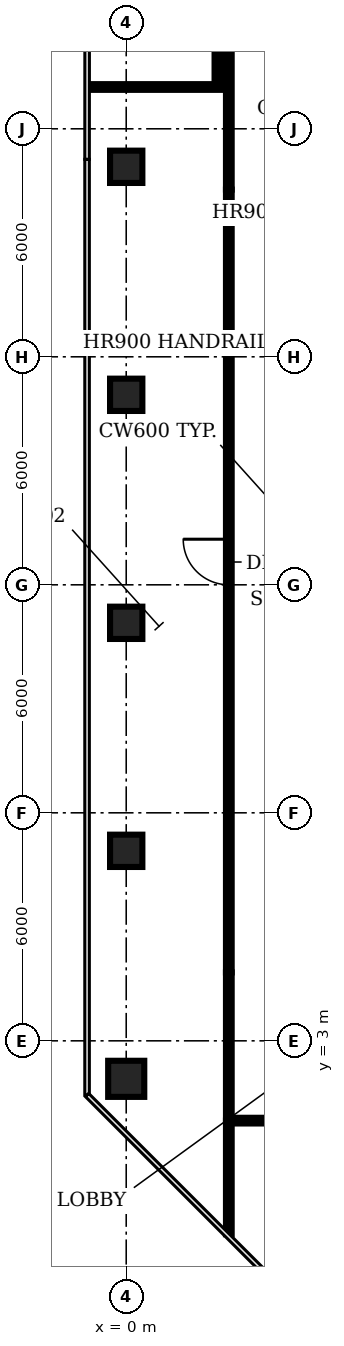
"""IFC4 building model, lengths in metres.
Left out: names, types, materials, properties, quantities, classifications, styles, units other than length and angle.
Written with IfcOpenShell. Run it as: python <this file> out.ifc"""

import sys

from ifc_helpers import new_model, si_unit, direction, frame, frame_2d, origin, origin_2d, place, context, subcontext, project, spatial, rectangle, circle, extrude, element, fill, save


model = new_model("IFC4")
c1 = context("Model", 3, precision=1e-05, world=origin(), true_north=direction((0.0, 1.0)))
c2 = subcontext(c1, "Body", "Model", "MODEL_VIEW")
j1 = project(units=[si_unit("LENGTHUNIT", "METRE"), si_unit("PLANEANGLEUNIT", "RADIAN")], contexts=[c1])
p1 = place(None, origin())
s1 = spatial("IfcSite", under=j1, at=p1, CompositionType="ELEMENT")
p2 = place(p1, origin())
s2 = spatial("IfcBuilding", under=s1, at=p2, CompositionType="ELEMENT")
p3 = place(p2, frame((0.0, 0.0, 176.0)))
s3 = spatial("IfcBuildingStorey", under=s2, at=p3, CompositionType="ELEMENT", Elevation=176.0)
p4 = place(p3, frame((0.0, 2.0, 0.0), z_axis=(0.0, 0.0, 1.0), x_axis=(1.0, 0.0, 0.0)))
e1 = element("IfcColumn", 1, at=p4, inside=s3, PredefinedType="COLUMN", context=c2, shape_type="SweptSolid", body=[
    extrude(circle(Radius=0.475, at=origin_2d()), origin(), (0.0, 0.0, 1.0), 3.85),
])
for number, where, z_axis, x_axis in (
    (2, (0.0, 8.0, 0.0), (0.0, 0.0, 1.0), (1.0, 0.0, 0.0)),
    (3, (0.0, 14.0, 0.0), (0.0, 0.0, 1.0), (1.0, 0.0, 0.0)),
    (4, (0.0, 20.0, 0.0), (0.0, 0.0, 1.0), (1.0, 0.0, 0.0)),
    (5, (0.0, 26.0, 0.0), (0.0, 0.0, 1.0), (1.0, 0.0, 0.0)),
):
    element("IfcColumn", number, at=place(p3, frame(where, z_axis=z_axis, x_axis=x_axis)), inside=s3, PredefinedType="COLUMN", context=c2, shape_type="SweptSolid", body=[
        extrude(rectangle(XDim=0.85, YDim=0.85, at=origin_2d()), origin(), (0.0, 0.0, 1.0), 3.85),
    ])
p5 = place(p3, frame((-0.969, 28.1, 0.0), z_axis=(0.0, 0.0, 1.0), x_axis=(1.0, 0.0, 0.0)))
e6 = element("IfcWall", 6, at=p5, inside=s3, PredefinedType="PARTITIONING", context=c2, shape_type="SweptSolid", body=[
    extrude(rectangle(XDim=3.669, YDim=0.15, at=frame_2d((1.834, 0.0))), origin(), (0.0, 0.0, 1.0), 2.88),
])
p6 = place(p3, frame((2.4, 28.1, 0.0), z_axis=(0.0, 0.0, 1.0), x_axis=(0.0, 1.0, 0.0)))
e7 = element("IfcWall", 7, at=p6, inside=s3, PredefinedType="PARTITIONING", context=c2, shape_type="SweptSolid", body=[
    extrude(rectangle(XDim=6.0, YDim=0.15, at=frame_2d((3.0, 0.0))), origin(), (0.0, 0.0, 1.0), 2.88),
])
p7 = place(p3, frame((2.7, -2.09, 0.0), z_axis=(0.0, 0.0, 1.0), x_axis=(0.0, 1.0, 0.0)))
e8 = element("IfcWall", 8, at=p7, inside=s3, PredefinedType="PARTITIONING", context=c2, shape_type="SweptSolid", body=[
    extrude(rectangle(XDim=2.99, YDim=0.15, at=frame_2d((1.495, 0.0))), origin(), (0.0, 0.0, 1.0), 2.88),
])
p8 = place(p3, frame((2.7, 0.9, 0.0), z_axis=(0.0, 0.0, 1.0), x_axis=(0.0, 1.0, 0.0)))
e9 = element("IfcWall", 9, at=p8, inside=s3, PredefinedType="PARTITIONING", context=c2, shape_type="SweptSolid", body=[
    extrude(rectangle(XDim=3.9, YDim=0.15, at=frame_2d((1.95, 0.0))), origin(), (0.0, 0.0, 1.0), 2.88),
])
p9 = place(p3, frame((2.7, 4.8, 0.0), z_axis=(0.0, 0.0, 1.0), x_axis=(0.0, 1.0, 0.0)))
e10 = element("IfcWall", 10, at=p9, inside=s3, PredefinedType="PARTITIONING", context=c2, shape_type="SweptSolid", body=[
    extrude(rectangle(XDim=20.6, YDim=0.15, at=frame_2d((10.3, 0.0))), origin(), (0.0, 0.0, 1.0), 2.88),
])
p10 = place(p9, frame((10.2, 0.0, 0.0)))
e11 = element("IfcOpeningElement", 11, at=p10, cuts=e10, PredefinedType="OPENING", context=c2, shape_type="SweptSolid", body=[
    extrude(rectangle(XDim=1.2, YDim=2.1, at=frame_2d((0.6, 1.05))), frame((0.0, 0.085, 0.0), z_axis=(0.0, -1.0, 0.0), x_axis=(1.0, 0.0, 0.0)), (0.0, 0.0, 1.0), 0.17),
])
p11 = place(p3, frame((2.7, 25.4, 0.0), z_axis=(0.0, 0.0, 1.0), x_axis=(0.0, 1.0, 0.0)))
e12 = element("IfcWall", 12, at=p11, inside=s3, PredefinedType="PARTITIONING", context=c2, shape_type="SweptSolid", body=[
    extrude(rectangle(XDim=3.9, YDim=0.15, at=frame_2d((1.95, 0.0))), origin(), (0.0, 0.0, 1.0), 2.88),
])
p12 = place(p3, frame((27.3, 0.9, 0.0), z_axis=(0.0, 0.0, 1.0), x_axis=(-1.0, 0.0, 0.0)))
e13 = element("IfcWall", 13, at=p12, inside=s3, PredefinedType="PARTITIONING", context=c2, shape_type="SweptSolid", body=[
    extrude(rectangle(XDim=24.6, YDim=0.15, at=frame_2d((12.3, 0.0))), origin(), (0.0, 0.0, 1.0), 2.88),
])
p13 = place(p12, frame((11.8, 0.0, 0.0)))
e14 = element("IfcOpeningElement", 14, at=p13, cuts=e13, PredefinedType="OPENING", context=c2, shape_type="SweptSolid", body=[
    extrude(rectangle(XDim=1.2, YDim=2.1, at=frame_2d((0.6, 1.05))), frame((0.0, 0.085, 0.0), z_axis=(0.0, -1.0, 0.0), x_axis=(1.0, 0.0, 0.0)), (0.0, 0.0, 1.0), 0.17),
])
p14 = place(p10, origin())
e15 = element("IfcDoor", 15, at=p14, inside=s3, OperationType="SINGLE_SWING_RIGHT", PredefinedType="DOOR", context=c2, shape_type="SweptSolid", body=[
    extrude(rectangle(XDim=1.2, YDim=2.1, at=frame_2d((0.6, 1.05))), frame((0.0, 0.025, 0.0), z_axis=(0.0, -1.0, 0.0), x_axis=(1.0, 0.0, 0.0)), (0.0, 0.0, 1.0), 0.05),
])
fill(e11, e15)
save(model, sys.argv[1])
